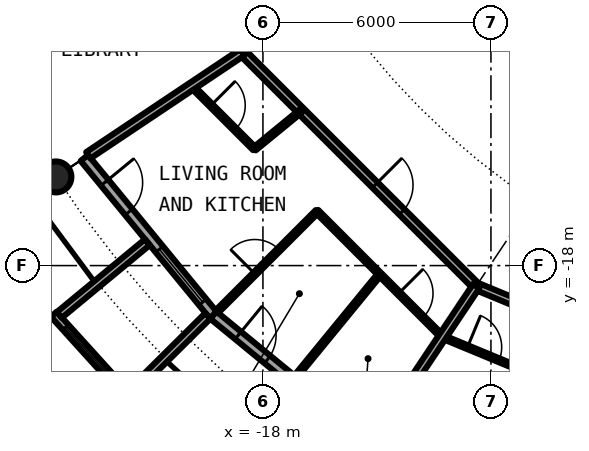
"""IFC4 building model, lengths in metres.
Left out: names, types, materials, properties, quantities, classifications, styles, units other than length and angle.
Written with IfcOpenShell. Run it as: python <this file> out.ifc"""

import sys

from ifc_helpers import new_model, si_unit, direction, frame, frame_2d, origin, origin_2d, place, context, subcontext, project, spatial, rectangle, circle, hollow_circle, extrude, element, fill, save


model = new_model("IFC4")
c1 = context("Model", 3, precision=1e-05, world=origin(), true_north=direction((0.0, 1.0)))
c2 = subcontext(c1, "Body", "Model", "MODEL_VIEW")
j1 = project(units=[si_unit("LENGTHUNIT", "METRE"), si_unit("PLANEANGLEUNIT", "RADIAN")], contexts=[c1])
p1 = place(None, origin())
s1 = spatial("IfcSite", under=j1, at=p1, CompositionType="ELEMENT")
p2 = place(p1, origin())
s2 = spatial("IfcBuilding", under=s1, at=p2, CompositionType="ELEMENT")
p3 = place(p2, frame((0.0, 0.0, 170.75)))
s3 = spatial("IfcBuildingStorey", under=s2, at=p3, CompositionType="ELEMENT", Elevation=170.75)
p4 = place(p3, frame((-23.448, -15.667, 0.0), z_axis=(0.0, 0.0, 1.0), x_axis=(1.0, 0.0, 0.0)))
e1 = element("IfcColumn", 1, at=p4, inside=s3, PredefinedType="COLUMN", context=c2, shape_type="SweptSolid", body=[
    extrude(hollow_circle(Radius=0.406, WallThickness=0.04, at=origin_2d()), origin(), (0.0, 0.0, 1.0), 3.05),
])
p5 = place(p3, frame((-22.699, -15.167, 0.0), z_axis=(0.0, 0.0, 1.0), x_axis=(0.634382322723, -0.773019449054, 0.0)))
e2 = element("IfcWall", 2, at=p5, inside=s3, PredefinedType="SOLIDWALL", context=c2, shape_type="SweptSolid", body=[
    extrude(rectangle(XDim=5.352, YDim=0.25, at=frame_2d((2.676, 0.0))), origin(), (0.0, 0.0, 1.0), 2.7),
])
p6 = place(p5, frame((0.841, 0.0, 0.0)))
e3 = element("IfcOpeningElement", 3, at=p6, cuts=e2, PredefinedType="OPENING", context=c2, shape_type="SweptSolid", body=[
    extrude(rectangle(XDim=1.0, YDim=2.2, at=frame_2d((0.5, 1.1))), frame((0.0, 0.135, 0.0), z_axis=(0.0, -1.0, 0.0), x_axis=(1.0, 0.0, 0.0)), (0.0, 0.0, 1.0), 0.27),
])
p7 = place(p5, frame((3.111, 0.0, 0.3)))
e4 = element("IfcOpeningElement", 4, at=p7, cuts=e2, PredefinedType="OPENING", context=c2, shape_type="SweptSolid", body=[
    extrude(rectangle(XDim=1.8, YDim=2.1, at=frame_2d((0.9, 1.05))), frame((0.0, 0.135, 0.0), z_axis=(0.0, -1.0, 0.0), x_axis=(1.0, 0.0, 0.0)), (0.0, 0.0, 1.0), 0.27),
])
p8 = place(p3, frame((-23.503, -19.282, -0.03), z_axis=(0.0, 0.0, 1.0), x_axis=(0.671506829416, -0.740998365753, 0.0)))
e5 = element("IfcWall", 5, at=p8, inside=s3, PredefinedType="SOLIDWALL", context=c2, shape_type="SweptSolid", body=[
    extrude(rectangle(XDim=2.993, YDim=0.2, at=frame_2d((1.497, 0.0))), origin(), (0.0, 0.0, 1.0), 2.73),
])
p9 = place(p8, frame((0.457, 0.0, 0.33)))
e6 = element("IfcOpeningElement", 6, at=p9, cuts=e5, PredefinedType="OPENING", context=c2, shape_type="SweptSolid", body=[
    extrude(circle(Radius=1.04, at=frame_2d((1.04, 1.04))), frame((0.0, 0.11, 0.0), z_axis=(0.0, -1.0, 0.0), x_axis=(1.0, 0.0, 0.0)), (0.0, 0.0, 1.0), 0.22),
])
p10 = place(p3, frame((-21.041, -17.384, -0.03), z_axis=(0.0, 0.0, 1.0), x_axis=(-0.770784861449, -0.63709551667, 0.0)))
e7 = element("IfcWall", 7, at=p10, inside=s3, PredefinedType="SOLIDWALL", context=c2, shape_type="SweptSolid", body=[
    extrude(rectangle(XDim=3.006, YDim=0.2, at=frame_2d((1.503, 0.0))), origin(), (0.0, 0.0, 1.0), 2.73),
])
p11 = place(p3, frame((-19.45, -19.323, -0.03), z_axis=(0.0, 0.0, 1.0), x_axis=(-0.709727076896, -0.704476739375, 0.0)))
e8 = element("IfcWall", 8, at=p11, inside=s3, PredefinedType="SOLIDWALL", context=c2, shape_type="SweptSolid", body=[
    extrude(rectangle(XDim=2.883, YDim=0.2, at=frame_2d((1.441, 0.0))), origin(), (0.0, 0.0, 1.0), 2.73),
])
p12 = place(p3, frame((-19.304, -19.304, 0.0), z_axis=(0.0, 0.0, 1.0), x_axis=(0.773019449054, -0.634382322723, 0.0)))
e9 = element("IfcWall", 9, at=p12, inside=s3, PredefinedType="SOLIDWALL", context=c2, shape_type="SweptSolid", body=[
    extrude(rectangle(XDim=5.352, YDim=0.25, at=frame_2d((2.676, 0.0))), origin(), (0.0, 0.0, 1.0), 2.7),
])
p13 = place(p12, frame((0.841, 0.0, 0.0)))
e10 = element("IfcOpeningElement", 10, at=p13, cuts=e9, PredefinedType="OPENING", context=c2, shape_type="SweptSolid", body=[
    extrude(rectangle(XDim=1.0, YDim=2.2, at=frame_2d((0.5, 1.1))), frame((0.0, 0.135, 0.0), z_axis=(0.0, -1.0, 0.0), x_axis=(1.0, 0.0, 0.0)), (0.0, 0.0, 1.0), 0.27),
])
p14 = place(p12, frame((3.111, 0.0, 0.3)))
e11 = element("IfcOpeningElement", 11, at=p14, cuts=e9, PredefinedType="OPENING", context=c2, shape_type="SweptSolid", body=[
    extrude(rectangle(XDim=1.8, YDim=2.1, at=frame_2d((0.9, 1.05))), frame((0.0, 0.135, 0.0), z_axis=(0.0, -1.0, 0.0), x_axis=(1.0, 0.0, 0.0)), (0.0, 0.0, 1.0), 0.27),
])
p15 = place(p3, frame((-19.872, -13.278, 0.0), z_axis=(0.0, 0.0, 1.0), x_axis=(0.706897299114, -0.707316201218, 0.0)))
e12 = element("IfcWall", 12, at=p15, inside=s3, PredefinedType="PARTITIONING", context=c2, shape_type="SweptSolid", body=[
    extrude(rectangle(XDim=2.331, YDim=0.1, at=frame_2d((1.166, 0.0))), origin(), (0.0, 0.0, 1.0), 2.7),
])
p16 = place(p15, frame((0.716, 0.0, 0.0)))
e13 = element("IfcOpeningElement", 13, at=p16, cuts=e12, PredefinedType="OPENING", context=c2, shape_type="SweptSolid", body=[
    extrude(rectangle(XDim=0.9, YDim=2.3, at=frame_2d((0.45, 1.15))), frame((0.0, 0.06, 0.0), z_axis=(0.0, -1.0, 0.0), x_axis=(1.0, 0.0, 0.0)), (0.0, 0.0, 1.0), 0.12),
])
p17 = place(p3, frame((-16.581, -16.571, 0.0), z_axis=(0.0, 0.0, 1.0), x_axis=(0.706923494552, -0.707290020325, 0.0)))
e14 = element("IfcWall", 14, at=p17, inside=s3, PredefinedType="PARTITIONING", context=c2, shape_type="SweptSolid", body=[
    extrude(rectangle(XDim=4.663, YDim=0.1, at=frame_2d((2.331, 0.0))), origin(), (0.0, 0.0, 1.0), 2.7),
])
p18 = place(p17, frame((3.051, 0.0, 0.0)))
e15 = element("IfcOpeningElement", 15, at=p18, cuts=e14, PredefinedType="OPENING", context=c2, shape_type="SweptSolid", body=[
    extrude(rectangle(XDim=0.9, YDim=2.3, at=frame_2d((0.45, 1.15))), frame((0.0, 0.06, 0.0), z_axis=(0.0, -1.0, 0.0), x_axis=(1.0, 0.0, 0.0)), (0.0, 0.0, 1.0), 0.12),
])
p19 = place(p3, frame((-13.278, -19.873, 0.0), z_axis=(0.0, 0.0, 1.0), x_axis=(0.923920484476, -0.38258455061, 0.0)))
e16 = element("IfcWall", 16, at=p19, inside=s3, PredefinedType="PARTITIONING", context=c2, shape_type="SweptSolid", body=[
    extrude(rectangle(XDim=4.663, YDim=0.1, at=frame_2d((2.332, 0.0))), origin(), (0.0, 0.0, 1.0), 2.7),
])
p20 = place(p19, frame((0.715, 0.0, 0.0)))
e17 = element("IfcOpeningElement", 17, at=p20, cuts=e16, PredefinedType="OPENING", context=c2, shape_type="SweptSolid", body=[
    extrude(rectangle(XDim=0.9, YDim=2.3, at=frame_2d((0.45, 1.15))), frame((0.0, 0.06, 0.0), z_axis=(0.0, -1.0, 0.0), x_axis=(1.0, 0.0, 0.0)), (0.0, 0.0, 1.0), 0.12),
])
p21 = place(p3, frame((-19.307, -10.935, 0.0), z_axis=(0.0, 0.0, 1.0), x_axis=(0.465605550524, -0.884992356646, 0.0)))
e18 = element("IfcWall", 18, at=p21, inside=s3, PredefinedType="PARTITIONING", context=c2, shape_type="SweptSolid", body=[
    extrude(rectangle(XDim=1.643, YDim=0.2, at=frame_2d((0.821, 0.0))), origin(), (0.0, 0.0, 1.0), 2.7),
])
p22 = place(p3, frame((-18.542, -12.389, 0.0), z_axis=(0.0, 0.0, 1.0), x_axis=(0.707106781187, -0.707106781187, 0.0)))
e19 = element("IfcWall", 19, at=p22, inside=s3, PredefinedType="PARTITIONING", context=c2, shape_type="SweptSolid", body=[
    extrude(rectangle(XDim=8.702, YDim=0.2, at=frame_2d((4.351, 0.0))), origin(), (0.0, 0.0, 1.0), 2.7),
])
p23 = place(p22, frame((4.938, 0.0, 0.0)))
e20 = element("IfcOpeningElement", 20, at=p23, cuts=e19, PredefinedType="OPENING", context=c2, shape_type="SweptSolid", body=[
    extrude(rectangle(XDim=1.0, YDim=2.3, at=frame_2d((0.5, 1.15))), frame((0.0, 0.11, 0.0), z_axis=(0.0, -1.0, 0.0), x_axis=(1.0, 0.0, 0.0)), (0.0, 0.0, 1.0), 0.22),
])
p24 = place(p3, frame((-12.389, -18.542, 0.0), z_axis=(0.0, 0.0, 1.0), x_axis=(0.923867858178, -0.382711615483, 0.0)))
e21 = element("IfcWall", 21, at=p24, inside=s3, PredefinedType="PARTITIONING", context=c2, shape_type="SweptSolid", body=[
    extrude(rectangle(XDim=8.709, YDim=0.2, at=frame_2d((4.354, 0.0))), origin(), (0.0, 0.0, 1.0), 2.7),
])
p25 = place(p24, frame((2.763, 0.0, 0.0)))
e22 = element("IfcOpeningElement", 22, at=p25, cuts=e21, PredefinedType="OPENING", context=c2, shape_type="SweptSolid", body=[
    extrude(rectangle(XDim=1.0, YDim=2.3, at=frame_2d((0.5, 1.15))), frame((0.0, 0.11, 0.0), z_axis=(0.0, -1.0, 0.0), x_axis=(1.0, 0.0, 0.0)), (0.0, 0.0, 1.0), 0.22),
])
p26 = place(p3, frame((-13.309, -10.775, 0.0), z_axis=(0.0, 0.0, 1.0), x_axis=(0.831501812692, -0.555522038708, 0.0)))
e23 = element("IfcWall", 23, at=p26, inside=s3, PredefinedType="PARTITIONING", context=c2, shape_type="SweptSolid", body=[
    extrude(rectangle(XDim=11.856, YDim=0.2, at=frame_2d((5.928, 0.0))), origin(), (0.0, 0.0, 1.0), 2.7),
])
p27 = place(p26, frame((6.272, 0.0, 0.0)))
e24 = element("IfcOpeningElement", 24, at=p27, cuts=e23, PredefinedType="OPENING", context=c2, shape_type="SweptSolid", body=[
    extrude(rectangle(XDim=1.0, YDim=2.3, at=frame_2d((0.5, 1.15))), frame((0.0, 0.11, 0.0), z_axis=(0.0, -1.0, 0.0), x_axis=(1.0, 0.0, 0.0)), (0.0, 0.0, 1.0), 0.22),
])
p28 = place(p3, frame((-22.595, -15.098, 0.0), z_axis=(0.0, 0.0, 1.0), x_axis=(0.831387096605, 0.55569370664, 0.0)))
e25 = element("IfcWall", 25, at=p28, inside=s3, PredefinedType="PARTITIONING", context=c2, shape_type="SweptSolid", body=[
    extrude(rectangle(XDim=4.875, YDim=0.2, at=frame_2d((2.438, 0.0))), origin(), (0.0, 0.0, 1.0), 2.7),
])
p29 = place(p3, frame((-19.216, -19.216, 0.0), z_axis=(0.0, 0.0, 1.0), x_axis=(0.707106781187, 0.707106781187, 0.0)))
e26 = element("IfcWall", 26, at=p29, inside=s3, PredefinedType="PARTITIONING", context=c2, shape_type="SweptSolid", body=[
    extrude(rectangle(XDim=3.735, YDim=0.1, at=frame_2d((1.868, 0.0))), origin(), (0.0, 0.0, 1.0), 2.7),
])
p30 = place(p29, frame((1.417, 0.0, 0.0)))
e27 = element("IfcOpeningElement", 27, at=p30, cuts=e26, PredefinedType="OPENING", context=c2, shape_type="SweptSolid", body=[
    extrude(rectangle(XDim=0.9, YDim=2.3, at=frame_2d((0.45, 1.15))), frame((0.0, 0.06, 0.0), z_axis=(0.0, -1.0, 0.0), x_axis=(1.0, 0.0, 0.0)), (0.0, 0.0, 1.0), 0.12),
])
p31 = place(p3, frame((-18.222, -14.93, 0.0), z_axis=(0.0, 0.0, 1.0), x_axis=(0.773633255921, 0.633633636523, 0.0)))
e28 = element("IfcWall", 28, at=p31, inside=s3, PredefinedType="PARTITIONING", context=c2, shape_type="SweptSolid", body=[
    extrude(rectangle(XDim=1.578, YDim=0.1, at=frame_2d((0.789, 0.0))), origin(), (0.0, 0.0, 1.0), 2.7),
])
p32 = place(p3, frame((-17.22, -21.023, 0.0), z_axis=(0.0, 0.0, 1.0), x_axis=(0.633737383709, 0.773548271597, 0.0)))
e29 = element("IfcWall", 29, at=p32, inside=s3, PredefinedType="PARTITIONING", context=c2, shape_type="SweptSolid", body=[
    extrude(rectangle(XDim=3.618, YDim=0.1, at=frame_2d((1.809, 0.0))), origin(), (0.0, 0.0, 1.0), 2.7),
])
p33 = place(p3, frame((-15.097, -22.596, 0.0), z_axis=(0.0, 0.0, 1.0), x_axis=(0.555462686211, 0.831541462723, 0.0)))
e30 = element("IfcWall", 30, at=p33, inside=s3, PredefinedType="PARTITIONING", context=c2, shape_type="SweptSolid", body=[
    extrude(rectangle(XDim=4.875, YDim=0.2, at=frame_2d((2.438, 0.0))), origin(), (0.0, 0.0, 1.0), 2.7),
])
p34 = place(p3, frame((-12.833, -23.954, 0.0), z_axis=(0.0, 0.0, 1.0), x_axis=(0.472212052488, 0.881484984265, 0.0)))
e31 = element("IfcWall", 31, at=p34, inside=s3, PredefinedType="PARTITIONING", context=c2, shape_type="SweptSolid", body=[
    extrude(rectangle(XDim=3.619, YDim=0.1, at=frame_2d((1.81, 0.0))), origin(), (0.0, 0.0, 1.0), 2.7),
])
p35 = place(p6, origin())
e32 = element("IfcDoor", 32, at=p35, inside=s3, OperationType="SINGLE_SWING_LEFT", PredefinedType="DOOR", context=c2, shape_type="SweptSolid", body=[
    extrude(rectangle(XDim=1.0, YDim=2.2, at=frame_2d((0.5, 1.1))), frame((0.0, 0.025, 0.0), z_axis=(0.0, -1.0, 0.0), x_axis=(1.0, 0.0, 0.0)), (0.0, 0.0, 1.0), 0.05),
])
fill(e3, e32)
p36 = place(p7, origin())
e33 = element("IfcWindow", 33, at=p36, inside=s3, PartitioningType="SINGLE_PANEL", PredefinedType="WINDOW", context=c2, shape_type="SweptSolid", body=[
    extrude(rectangle(XDim=1.8, YDim=2.1, at=frame_2d((0.9, 1.05))), frame((0.0, 0.03, 0.0), z_axis=(0.0, -1.0, 0.0), x_axis=(1.0, 0.0, 0.0)), (0.0, 0.0, 1.0), 0.06),
])
fill(e4, e33)
p37 = place(p9, origin())
e34 = element("IfcWindow", 34, at=p37, inside=s3, PartitioningType="SINGLE_PANEL", PredefinedType="WINDOW", context=c2, shape_type="SweptSolid", body=[
    extrude(circle(Radius=1.04, at=frame_2d((1.04, 1.04))), frame((0.0, 0.03, 0.0), z_axis=(0.0, -1.0, 0.0), x_axis=(1.0, 0.0, 0.0)), (0.0, 0.0, 1.0), 0.06),
])
fill(e6, e34)
p38 = place(p13, origin())
e35 = element("IfcDoor", 35, at=p38, inside=s3, OperationType="SINGLE_SWING_LEFT", PredefinedType="DOOR", context=c2, shape_type="SweptSolid", body=[
    extrude(rectangle(XDim=1.0, YDim=2.2, at=frame_2d((0.5, 1.1))), frame((0.0, 0.025, 0.0), z_axis=(0.0, -1.0, 0.0), x_axis=(1.0, 0.0, 0.0)), (0.0, 0.0, 1.0), 0.05),
])
fill(e10, e35)
p39 = place(p23, origin())
e36 = element("IfcDoor", 36, at=p39, inside=s3, OperationType="SINGLE_SWING_RIGHT", PredefinedType="DOOR", context=c2, shape_type="SweptSolid", body=[
    extrude(rectangle(XDim=1.0, YDim=2.3, at=frame_2d((0.5, 1.15))), frame((0.0, 0.025, 0.0), z_axis=(0.0, -1.0, 0.0), x_axis=(1.0, 0.0, 0.0)), (0.0, 0.0, 1.0), 0.05),
])
fill(e20, e36)
p40 = place(p16, origin())
e37 = element("IfcDoor", 37, at=p40, inside=s3, OperationType="SINGLE_SWING_RIGHT", PredefinedType="DOOR", context=c2, shape_type="SweptSolid", body=[
    extrude(rectangle(XDim=0.9, YDim=2.3, at=frame_2d((0.45, 1.15))), frame((0.0, 0.025, 0.0), z_axis=(0.0, -1.0, 0.0), x_axis=(1.0, 0.0, 0.0)), (0.0, 0.0, 1.0), 0.05),
])
fill(e13, e37)
p41 = place(p30, origin())
e38 = element("IfcDoor", 38, at=p41, inside=s3, OperationType="SINGLE_SWING_LEFT", PredefinedType="DOOR", context=c2, shape_type="SweptSolid", body=[
    extrude(rectangle(XDim=0.9, YDim=2.3, at=frame_2d((0.45, 1.15))), frame((0.0, 0.025, 0.0), z_axis=(0.0, -1.0, 0.0), x_axis=(1.0, 0.0, 0.0)), (0.0, 0.0, 1.0), 0.05),
])
fill(e27, e38)
p42 = place(p18, origin())
e39 = element("IfcDoor", 39, at=p42, inside=s3, OperationType="SINGLE_SWING_RIGHT", PredefinedType="DOOR", context=c2, shape_type="SweptSolid", body=[
    extrude(rectangle(XDim=0.9, YDim=2.3, at=frame_2d((0.45, 1.15))), frame((0.0, 0.025, 0.0), z_axis=(0.0, -1.0, 0.0), x_axis=(1.0, 0.0, 0.0)), (0.0, 0.0, 1.0), 0.05),
])
fill(e15, e39)
p43 = place(p20, origin())
e40 = element("IfcDoor", 40, at=p43, inside=s3, OperationType="SINGLE_SWING_LEFT", PredefinedType="DOOR", context=c2, shape_type="SweptSolid", body=[
    extrude(rectangle(XDim=0.9, YDim=2.3, at=frame_2d((0.45, 1.15))), frame((0.0, 0.025, 0.0), z_axis=(0.0, -1.0, 0.0), x_axis=(1.0, 0.0, 0.0)), (0.0, 0.0, 1.0), 0.05),
])
fill(e17, e40)
save(model, sys.argv[1])
